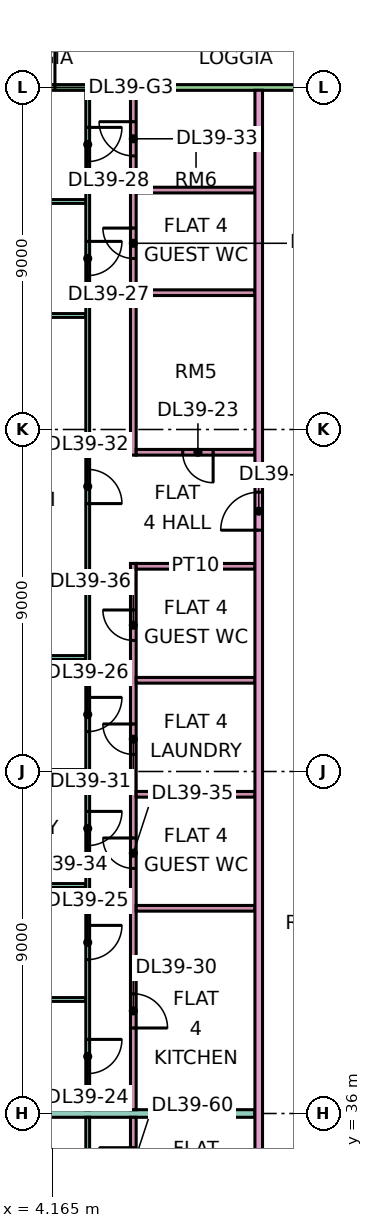
"""IFC4 building model, lengths in metres.
Left out: names, types, materials, properties, quantities, classifications, styles, units other than length and angle.
Written with IfcOpenShell. Run it as: python <this file> out.ifc"""

import sys

from ifc_helpers import new_model, si_unit, direction, frame, frame_2d, origin, place, context, subcontext, project, spatial, rectangle, extrude, element, fill, save


model = new_model("IFC4")
c1 = context("Model", 3, precision=1e-05, world=origin(), true_north=direction((0.0, 1.0)))
c2 = subcontext(c1, "Body", "Model", "MODEL_VIEW")
j1 = project(units=[si_unit("LENGTHUNIT", "METRE"), si_unit("PLANEANGLEUNIT", "RADIAN")], contexts=[c1])
p1 = place(None, origin())
s1 = spatial("IfcSite", under=j1, at=p1, CompositionType="ELEMENT")
p2 = place(p1, origin())
s2 = spatial("IfcBuilding", under=s1, at=p2, CompositionType="ELEMENT")
p3 = place(p2, frame((0.0, 0.0, 172.4)))
s3 = spatial("IfcBuildingStorey", under=s2, at=p3, CompositionType="ELEMENT", Elevation=172.4)
p4 = place(p3, frame((11.925, 63.0, 0.0), z_axis=(0.0, 0.0, 1.0), x_axis=(-1.0, 0.0, 0.0)))
e1 = element("IfcWall", 1, at=p4, inside=s3, PredefinedType="SOLIDWALL", context=c2, shape_type="SweptSolid", body=[
    extrude(rectangle(XDim=10.35, YDim=0.15, at=frame_2d((5.175, 0.0))), origin(), (0.0, 0.0, 1.0), 3.35),
])
p5 = place(p4, frame((7.688, 0.0, 0.0)))
e2 = element("IfcOpeningElement", 2, at=p5, cuts=e1, PredefinedType="OPENING", context=c2, shape_type="SweptSolid", body=[
    extrude(rectangle(XDim=1.8, YDim=2.4, at=frame_2d((0.9, 1.2))), frame((0.0, 0.085, 0.0), z_axis=(0.0, -1.0, 0.0), x_axis=(1.0, 0.0, 0.0)), (0.0, 0.0, 1.0), 0.17),
])
p6 = place(p3, frame((-1.351, 39.0, 0.0), z_axis=(0.0, 0.0, 1.0), x_axis=(1.0, 0.0, 0.0)))
e3 = element("IfcWall", 3, at=p6, inside=s3, PredefinedType="PARTITIONING", context=c2, shape_type="SweptSolid", body=[
    extrude(rectangle(XDim=6.401, YDim=0.1, at=frame_2d((3.201, 0.0))), origin(), (0.0, 0.0, 1.0), 3.35),
])
p7 = place(p3, frame((0.0, 36.0, 0.0), z_axis=(0.0, 0.0, 1.0), x_axis=(1.0, 0.0, 0.0)))
e4 = element("IfcWall", 4, at=p7, inside=s3, PredefinedType="PARTITIONING", context=c2, shape_type="SweptSolid", body=[
    extrude(rectangle(XDim=9.5, YDim=0.2, at=frame_2d((4.75, 0.0))), origin(), (0.0, 0.0, 1.0), 3.35),
])
p8 = place(p3, frame((-1.35, 42.0, 0.0), z_axis=(0.0, 0.0, 1.0), x_axis=(1.0, 0.0, 0.0)))
e5 = element("IfcWall", 5, at=p8, inside=s3, PredefinedType="PARTITIONING", context=c2, shape_type="SweptSolid", body=[
    extrude(rectangle(XDim=6.4, YDim=0.1, at=frame_2d((3.2, 0.0))), origin(), (0.0, 0.0, 1.0), 3.35),
])
p9 = place(p3, frame((0.0, 45.0, 0.0), z_axis=(0.0, 0.0, 1.0), x_axis=(1.0, 0.0, 0.0)))
e6 = element("IfcWall", 6, at=p9, inside=s3, PredefinedType="PARTITIONING", context=c2, shape_type="SweptSolid", body=[
    extrude(rectangle(XDim=5.05, YDim=0.1, at=frame_2d((2.525, 0.0))), origin(), (0.0, 0.0, 1.0), 3.35),
])
p10 = place(p3, frame((0.0, 48.0, 0.0), z_axis=(0.0, 0.0, 1.0), x_axis=(1.0, 0.0, 0.0)))
e7 = element("IfcWall", 7, at=p10, inside=s3, PredefinedType="PARTITIONING", context=c2, shape_type="SweptSolid", body=[
    extrude(rectangle(XDim=5.05, YDim=0.1, at=frame_2d((2.525, 0.0))), origin(), (0.0, 0.0, 1.0), 3.35),
])
for number, where, z_axis, x_axis in (
    (8, (0.074, 57.0, 0.0), (0.0, 0.0, 1.0), (1.0, 0.0, 0.0)),
    (9, (0.074, 60.0, 0.0), (0.0, 0.0, 1.0), (1.0, 0.0, 0.0)),
):
    element("IfcWall", number, at=place(p3, frame(where, z_axis=z_axis, x_axis=x_axis)), inside=s3, PredefinedType="PARTITIONING", context=c2, shape_type="SweptSolid", body=[
        extrude(rectangle(XDim=4.976, YDim=0.1, at=frame_2d((2.488, 0.0))), origin(), (0.0, 0.0, 1.0), 3.35),
    ])
p11 = place(p3, frame((5.1, 29.95, 0.0), z_axis=(0.0, 0.0, 1.0), x_axis=(0.0, 1.0, 0.0)))
e10 = element("IfcWall", 10, at=p11, inside=s3, PredefinedType="PARTITIONING", context=c2, shape_type="SweptSolid", body=[
    extrude(rectangle(XDim=5.95, YDim=0.1, at=frame_2d((2.975, 0.0))), origin(), (0.0, 0.0, 1.0), 3.35),
])
p12 = place(p11, frame((4.1, 0.0, 0.0)))
e11 = element("IfcOpeningElement", 11, at=p12, cuts=e10, PredefinedType="OPENING", context=c2, shape_type="SweptSolid", body=[
    extrude(rectangle(XDim=0.9, YDim=2.1, at=frame_2d((0.45, 1.05))), frame((0.0, 0.06, 0.0), z_axis=(0.0, -1.0, 0.0), x_axis=(1.0, 0.0, 0.0)), (0.0, 0.0, 1.0), 0.12),
])
p13 = place(p11, frame((1.1, 0.0, 0.0)))
e12 = element("IfcOpeningElement", 12, at=p13, cuts=e10, PredefinedType="OPENING", context=c2, shape_type="SweptSolid", body=[
    extrude(rectangle(XDim=0.9, YDim=2.1, at=frame_2d((0.45, 1.05))), frame((0.0, 0.06, 0.0), z_axis=(0.0, -1.0, 0.0), x_axis=(1.0, 0.0, 0.0)), (0.0, 0.0, 1.0), 0.12),
])
p14 = place(p3, frame((5.1, 36.1, 0.0), z_axis=(0.0, 0.0, 1.0), x_axis=(0.0, 1.0, 0.0)))
e13 = element("IfcWall", 13, at=p14, inside=s3, PredefinedType="PARTITIONING", context=c2, shape_type="SweptSolid", body=[
    extrude(rectangle(XDim=26.826, YDim=0.1, at=frame_2d((13.413, 0.0))), origin(), (0.0, 0.0, 1.0), 3.35),
])
p15 = place(p14, frame((0.95, 0.0, 0.0)))
e14 = element("IfcOpeningElement", 14, at=p15, cuts=e13, PredefinedType="OPENING", context=c2, shape_type="SweptSolid", body=[
    extrude(rectangle(XDim=0.9, YDim=2.1, at=frame_2d((0.45, 1.05))), frame((0.0, 0.06, 0.0), z_axis=(0.0, -1.0, 0.0), x_axis=(1.0, 0.0, 0.0)), (0.0, 0.0, 1.0), 0.12),
])
p16 = place(p14, frame((3.95, 0.0, 0.0)))
e15 = element("IfcOpeningElement", 15, at=p16, cuts=e13, PredefinedType="OPENING", context=c2, shape_type="SweptSolid", body=[
    extrude(rectangle(XDim=0.9, YDim=2.1, at=frame_2d((0.45, 1.05))), frame((0.0, 0.06, 0.0), z_axis=(0.0, -1.0, 0.0), x_axis=(1.0, 0.0, 0.0)), (0.0, 0.0, 1.0), 0.12),
])
p17 = place(p14, frame((9.95, 0.0, 0.0)))
e16 = element("IfcOpeningElement", 16, at=p17, cuts=e13, PredefinedType="OPENING", context=c2, shape_type="SweptSolid", body=[
    extrude(rectangle(XDim=0.9, YDim=2.1, at=frame_2d((0.45, 1.05))), frame((0.0, 0.06, 0.0), z_axis=(0.0, -1.0, 0.0), x_axis=(1.0, 0.0, 0.0)), (0.0, 0.0, 1.0), 0.12),
])
p18 = place(p14, frame((21.95, 0.0, 0.0)))
e17 = element("IfcOpeningElement", 17, at=p18, cuts=e13, PredefinedType="OPENING", context=c2, shape_type="SweptSolid", body=[
    extrude(rectangle(XDim=0.9, YDim=2.1, at=frame_2d((0.45, 1.05))), frame((0.0, 0.06, 0.0), z_axis=(0.0, -1.0, 0.0), x_axis=(1.0, 0.0, 0.0)), (0.0, 0.0, 1.0), 0.12),
])
p19 = place(p14, frame((24.95, 0.0, 0.0)))
e18 = element("IfcOpeningElement", 18, at=p19, cuts=e13, PredefinedType="OPENING", context=c2, shape_type="SweptSolid", body=[
    extrude(rectangle(XDim=0.9, YDim=2.1, at=frame_2d((0.45, 1.05))), frame((0.0, 0.06, 0.0), z_axis=(0.0, -1.0, 0.0), x_axis=(1.0, 0.0, 0.0)), (0.0, 0.0, 1.0), 0.12),
])
p20 = place(p14, frame((15.95, 0.0, 0.0)))
e19 = element("IfcOpeningElement", 19, at=p20, cuts=e13, PredefinedType="OPENING", context=c2, shape_type="SweptSolid", body=[
    extrude(rectangle(XDim=0.9, YDim=2.1, at=frame_2d((0.45, 1.05))), frame((0.0, 0.06, 0.0), z_axis=(0.0, -1.0, 0.0), x_axis=(1.0, 0.0, 0.0)), (0.0, 0.0, 1.0), 0.12),
])
p21 = place(p14, frame((6.95, 0.0, 0.0)))
e20 = element("IfcOpeningElement", 20, at=p21, cuts=e13, PredefinedType="OPENING", context=c2, shape_type="SweptSolid", body=[
    extrude(rectangle(XDim=0.9, YDim=2.1, at=frame_2d((0.45, 1.05))), frame((0.0, 0.06, 0.0), z_axis=(0.0, -1.0, 0.0), x_axis=(1.0, 0.0, 0.0)), (0.0, 0.0, 1.0), 0.12),
])
p22 = place(p3, frame((6.3, 26.325, 0.0), z_axis=(0.0, 0.0, 1.0), x_axis=(0.0, 1.0, 0.0)))
e21 = element("IfcWall", 21, at=p22, inside=s3, PredefinedType="PARTITIONING", context=c2, shape_type="SweptSolid", body=[
    extrude(rectangle(XDim=9.575, YDim=0.15, at=frame_2d((4.788, 0.0))), origin(), (0.0, 0.0, 1.0), 3.35),
])
p23 = place(p22, frame((7.875, 0.0, 0.0)))
e22 = element("IfcOpeningElement", 22, at=p23, cuts=e21, PredefinedType="OPENING", context=c2, shape_type="SweptSolid", body=[
    extrude(rectangle(XDim=0.9, YDim=2.1, at=frame_2d((0.45, 1.05))), frame((0.0, 0.085, 0.0), z_axis=(0.0, -1.0, 0.0), x_axis=(1.0, 0.0, 0.0)), (0.0, 0.0, 1.0), 0.17),
])
p24 = place(p22, frame((4.725, 0.0, 0.0)))
e23 = element("IfcOpeningElement", 23, at=p24, cuts=e21, PredefinedType="OPENING", context=c2, shape_type="SweptSolid", body=[
    extrude(rectangle(XDim=0.8, YDim=2.1, at=frame_2d((0.4, 1.05))), frame((0.0, 0.085, 0.0), z_axis=(0.0, -1.0, 0.0), x_axis=(1.0, 0.0, 0.0)), (0.0, 0.0, 1.0), 0.17),
])
p25 = place(p3, frame((6.3, 36.1, 0.0), z_axis=(0.0, 0.0, 1.0), x_axis=(0.0, 1.0, 0.0)))
e24 = element("IfcWall", 24, at=p25, inside=s3, PredefinedType="PARTITIONING", context=c2, shape_type="SweptSolid", body=[
    extrude(rectangle(XDim=14.375, YDim=0.15, at=frame_2d((7.188, 0.0))), origin(), (0.0, 0.0, 1.0), 3.35),
])
p26 = place(p25, frame((2.15, 0.0, 0.0)))
e25 = element("IfcOpeningElement", 25, at=p26, cuts=e24, PredefinedType="OPENING", context=c2, shape_type="SweptSolid", body=[
    extrude(rectangle(XDim=0.9, YDim=2.1, at=frame_2d((0.45, 1.05))), frame((0.0, 0.085, 0.0), z_axis=(0.0, -1.0, 0.0), x_axis=(1.0, 0.0, 0.0)), (0.0, 0.0, 1.0), 0.17),
])
p27 = place(p25, frame((9.35, 0.0, 0.0)))
e26 = element("IfcOpeningElement", 26, at=p27, cuts=e24, PredefinedType="OPENING", context=c2, shape_type="SweptSolid", body=[
    extrude(rectangle(XDim=0.8, YDim=2.1, at=frame_2d((0.4, 1.05))), frame((0.0, 0.085, 0.0), z_axis=(0.0, -1.0, 0.0), x_axis=(1.0, 0.0, 0.0)), (0.0, 0.0, 1.0), 0.17),
])
p28 = place(p25, frame((6.35, 0.0, 0.0)))
e27 = element("IfcOpeningElement", 27, at=p28, cuts=e24, PredefinedType="OPENING", context=c2, shape_type="SweptSolid", body=[
    extrude(rectangle(XDim=0.8, YDim=2.1, at=frame_2d((0.4, 1.05))), frame((0.0, 0.085, 0.0), z_axis=(0.0, -1.0, 0.0), x_axis=(1.0, 0.0, 0.0)), (0.0, 0.0, 1.0), 0.17),
])
p29 = place(p25, frame((12.35, 0.0, 0.0)))
e28 = element("IfcOpeningElement", 28, at=p29, cuts=e24, PredefinedType="OPENING", context=c2, shape_type="SweptSolid", body=[
    extrude(rectangle(XDim=0.8, YDim=2.1, at=frame_2d((0.4, 1.05))), frame((0.0, 0.085, 0.0), z_axis=(0.0, -1.0, 0.0), x_axis=(1.0, 0.0, 0.0)), (0.0, 0.0, 1.0), 0.17),
])
p30 = place(p3, frame((6.3, 53.325, 0.0), z_axis=(0.0, 0.0, 1.0), x_axis=(0.0, 1.0, 0.0)))
e29 = element("IfcWall", 29, at=p30, inside=s3, PredefinedType="PARTITIONING", context=c2, shape_type="SweptSolid", body=[
    extrude(rectangle(XDim=9.601, YDim=0.15, at=frame_2d((4.801, 0.0))), origin(), (0.0, 0.0, 1.0), 3.35),
])
p31 = place(p30, frame((7.875, 0.0, 0.0)))
e30 = element("IfcOpeningElement", 30, at=p31, cuts=e29, PredefinedType="OPENING", context=c2, shape_type="SweptSolid", body=[
    extrude(rectangle(XDim=0.9, YDim=2.1, at=frame_2d((0.45, 1.05))), frame((0.0, 0.085, 0.0), z_axis=(0.0, -1.0, 0.0), x_axis=(1.0, 0.0, 0.0)), (0.0, 0.0, 1.0), 0.17),
])
p32 = place(p30, frame((5.175, 0.0, 0.0)))
e31 = element("IfcOpeningElement", 31, at=p32, cuts=e29, PredefinedType="OPENING", context=c2, shape_type="SweptSolid", body=[
    extrude(rectangle(XDim=0.8, YDim=2.1, at=frame_2d((0.4, 1.05))), frame((0.0, 0.085, 0.0), z_axis=(0.0, -1.0, 0.0), x_axis=(1.0, 0.0, 0.0)), (0.0, 0.0, 1.0), 0.17),
])
for number, where, z_axis, x_axis in (
    (32, (6.375, 41.4, 0.0), (0.0, 0.0, 1.0), (1.0, 0.0, 0.0)),
    (33, (6.375, 44.4, 0.0), (0.0, 0.0, 1.0), (1.0, 0.0, 0.0)),
    (34, (6.375, 47.4, 0.0), (0.0, 0.0, 1.0), (1.0, 0.0, 0.0)),
    (35, (6.375, 50.4, 0.0), (0.0, 0.0, 1.0), (1.0, 0.0, 0.0)),
):
    element("IfcWall", number, at=place(p3, frame(where, z_axis=z_axis, x_axis=x_axis)), inside=s3, PredefinedType="PARTITIONING", context=c2, shape_type="SweptSolid", body=[
        extrude(rectangle(XDim=3.125, YDim=0.15, at=frame_2d((1.562, 0.0))), origin(), (0.0, 0.0, 1.0), 3.35),
    ])
p33 = place(p3, frame((6.375, 53.4, 0.0), z_axis=(0.0, 0.0, 1.0), x_axis=(1.0, 0.0, 0.0)))
e36 = element("IfcWall", 36, at=p33, inside=s3, PredefinedType="PARTITIONING", context=c2, shape_type="SweptSolid", body=[
    extrude(rectangle(XDim=3.125, YDim=0.15, at=frame_2d((1.562, 0.0))), origin(), (0.0, 0.0, 1.0), 3.35),
])
p34 = place(p33, frame((1.225, 0.0, 0.0)))
e37 = element("IfcOpeningElement", 37, at=p34, cuts=e36, PredefinedType="OPENING", context=c2, shape_type="SweptSolid", body=[
    extrude(rectangle(XDim=0.8, YDim=2.1, at=frame_2d((0.4, 1.05))), frame((0.0, 0.085, 0.0), z_axis=(0.0, -1.0, 0.0), x_axis=(1.0, 0.0, 0.0)), (0.0, 0.0, 1.0), 0.17),
])
for number, where, z_axis, x_axis in (
    (38, (6.375, 57.6, 0.0), (0.0, 0.0, 1.0), (1.0, 0.0, 0.0)),
    (39, (6.375, 60.3, 0.0), (0.0, 0.0, 1.0), (1.0, 0.0, 0.0)),
):
    element("IfcWall", number, at=place(p3, frame(where, z_axis=z_axis, x_axis=x_axis)), inside=s3, PredefinedType="PARTITIONING", context=c2, shape_type="SweptSolid", body=[
        extrude(rectangle(XDim=3.125, YDim=0.15, at=frame_2d((1.562, 0.0))), origin(), (0.0, 0.0, 1.0), 3.35),
    ])
p35 = place(p3, frame((9.6, 20.0, 0.0), z_axis=(0.0, 0.0, 1.0), x_axis=(0.0, 1.0, 0.0)))
e40 = element("IfcWall", 40, at=p35, inside=s3, PredefinedType="PARTITIONING", context=c2, shape_type="SweptSolid", body=[
    extrude(rectangle(XDim=42.926, YDim=0.2, at=frame_2d((21.463, 0.0))), origin(), (0.0, 0.0, 1.0), 3.35),
])
p36 = place(p35, frame((31.35, 0.0, 0.0)))
e41 = element("IfcOpeningElement", 41, at=p36, cuts=e40, PredefinedType="OPENING", context=c2, shape_type="SweptSolid", body=[
    extrude(rectangle(XDim=1.0, YDim=2.1, at=frame_2d((0.5, 1.05))), frame((0.0, 0.11, 0.0), z_axis=(0.0, -1.0, 0.0), x_axis=(1.0, 0.0, 0.0)), (0.0, 0.0, 1.0), 0.22),
])
p37 = place(p35, frame((0.6, 0.0, 0.0)))
e42 = element("IfcOpeningElement", 42, at=p37, cuts=e40, PredefinedType="OPENING", context=c2, shape_type="SweptSolid", body=[
    extrude(rectangle(XDim=1.2, YDim=2.1, at=frame_2d((0.6, 1.05))), frame((0.0, 0.11, 0.0), z_axis=(0.0, -1.0, 0.0), x_axis=(1.0, 0.0, 0.0)), (0.0, 0.0, 1.0), 0.22),
])
p38 = place(p35, frame((3.9, 0.0, 0.0)))
e43 = element("IfcOpeningElement", 43, at=p38, cuts=e40, PredefinedType="OPENING", context=c2, shape_type="SweptSolid", body=[
    extrude(rectangle(XDim=1.0, YDim=2.1, at=frame_2d((0.5, 1.05))), frame((0.0, 0.11, 0.0), z_axis=(0.0, -1.0, 0.0), x_axis=(1.0, 0.0, 0.0)), (0.0, 0.0, 1.0), 0.22),
])
p39 = place(p5, frame((1.8, 0.0, 0.0), z_axis=(0.0, 0.0, 1.0), x_axis=(-1.0, 0.0, 0.0)))
e44 = element("IfcDoor", 44, at=p39, inside=s3, OperationType="DOUBLE_DOOR_SINGLE_SWING", PredefinedType="DOOR", context=c2, shape_type="SweptSolid", body=[
    extrude(rectangle(XDim=1.8, YDim=2.4, at=frame_2d((0.9, 1.2))), frame((0.0, 0.025, 0.0), z_axis=(0.0, -1.0, 0.0), x_axis=(1.0, 0.0, 0.0)), (0.0, 0.0, 1.0), 0.05),
])
fill(e2, e44)
p40 = place(p34, origin())
e45 = element("IfcDoor", 45, at=p40, inside=s3, OperationType="SINGLE_SWING_RIGHT", PredefinedType="DOOR", context=c2, shape_type="SweptSolid", body=[
    extrude(rectangle(XDim=0.8, YDim=2.1, at=frame_2d((0.4, 1.05))), frame((0.0, 0.025, 0.0), z_axis=(0.0, -1.0, 0.0), x_axis=(1.0, 0.0, 0.0)), (0.0, 0.0, 1.0), 0.05),
])
fill(e37, e45)
p41 = place(p15, origin())
e46 = element("IfcDoor", 46, at=p41, inside=s3, OperationType="SINGLE_SWING_RIGHT", PredefinedType="DOOR", context=c2, shape_type="SweptSolid", body=[
    extrude(rectangle(XDim=0.9, YDim=2.1, at=frame_2d((0.45, 1.05))), frame((0.0, 0.025, 0.0), z_axis=(0.0, -1.0, 0.0), x_axis=(1.0, 0.0, 0.0)), (0.0, 0.0, 1.0), 0.05),
])
fill(e14, e46)
p42 = place(p16, origin())
e47 = element("IfcDoor", 47, at=p42, inside=s3, OperationType="SINGLE_SWING_RIGHT", PredefinedType="DOOR", context=c2, shape_type="SweptSolid", body=[
    extrude(rectangle(XDim=0.9, YDim=2.1, at=frame_2d((0.45, 1.05))), frame((0.0, 0.025, 0.0), z_axis=(0.0, -1.0, 0.0), x_axis=(1.0, 0.0, 0.0)), (0.0, 0.0, 1.0), 0.05),
])
fill(e15, e47)
p43 = place(p17, origin())
e48 = element("IfcDoor", 48, at=p43, inside=s3, OperationType="SINGLE_SWING_RIGHT", PredefinedType="DOOR", context=c2, shape_type="SweptSolid", body=[
    extrude(rectangle(XDim=0.9, YDim=2.1, at=frame_2d((0.45, 1.05))), frame((0.0, 0.025, 0.0), z_axis=(0.0, -1.0, 0.0), x_axis=(1.0, 0.0, 0.0)), (0.0, 0.0, 1.0), 0.05),
])
fill(e16, e48)
p44 = place(p18, origin())
e49 = element("IfcDoor", 49, at=p44, inside=s3, OperationType="SINGLE_SWING_RIGHT", PredefinedType="DOOR", context=c2, shape_type="SweptSolid", body=[
    extrude(rectangle(XDim=0.9, YDim=2.1, at=frame_2d((0.45, 1.05))), frame((0.0, 0.025, 0.0), z_axis=(0.0, -1.0, 0.0), x_axis=(1.0, 0.0, 0.0)), (0.0, 0.0, 1.0), 0.05),
])
fill(e17, e49)
p45 = place(p19, origin())
e50 = element("IfcDoor", 50, at=p45, inside=s3, OperationType="SINGLE_SWING_RIGHT", PredefinedType="DOOR", context=c2, shape_type="SweptSolid", body=[
    extrude(rectangle(XDim=0.9, YDim=2.1, at=frame_2d((0.45, 1.05))), frame((0.0, 0.025, 0.0), z_axis=(0.0, -1.0, 0.0), x_axis=(1.0, 0.0, 0.0)), (0.0, 0.0, 1.0), 0.05),
])
fill(e18, e50)
p46 = place(p36, origin())
e51 = element("IfcDoor", 51, at=p46, inside=s3, OperationType="SINGLE_SWING_LEFT", PredefinedType="DOOR", context=c2, shape_type="SweptSolid", body=[
    extrude(rectangle(XDim=1.0, YDim=2.1, at=frame_2d((0.5, 1.05))), frame((0.0, 0.025, 0.0), z_axis=(0.0, -1.0, 0.0), x_axis=(1.0, 0.0, 0.0)), (0.0, 0.0, 1.0), 0.05),
])
fill(e41, e51)
p47 = place(p26, frame((0.9, 0.0, 0.0), z_axis=(0.0, 0.0, 1.0), x_axis=(-1.0, 0.0, 0.0)))
e52 = element("IfcDoor", 52, at=p47, inside=s3, OperationType="SINGLE_SWING_LEFT", PredefinedType="DOOR", context=c2, shape_type="SweptSolid", body=[
    extrude(rectangle(XDim=0.9, YDim=2.1, at=frame_2d((0.45, 1.05))), frame((0.0, 0.025, 0.0), z_axis=(0.0, -1.0, 0.0), x_axis=(1.0, 0.0, 0.0)), (0.0, 0.0, 1.0), 0.05),
])
fill(e25, e52)
p48 = place(p27, frame((0.8, 0.0, 0.0), z_axis=(0.0, 0.0, 1.0), x_axis=(-1.0, 0.0, 0.0)))
e53 = element("IfcDoor", 53, at=p48, inside=s3, OperationType="SINGLE_SWING_RIGHT", PredefinedType="DOOR", context=c2, shape_type="SweptSolid", body=[
    extrude(rectangle(XDim=0.8, YDim=2.1, at=frame_2d((0.4, 1.05))), frame((0.0, 0.025, 0.0), z_axis=(0.0, -1.0, 0.0), x_axis=(1.0, 0.0, 0.0)), (0.0, 0.0, 1.0), 0.05),
])
fill(e26, e53)
p49 = place(p20, frame((0.9, 0.0, 0.0), z_axis=(0.0, 0.0, 1.0), x_axis=(-1.0, 0.0, 0.0)))
e54 = element("IfcDoor", 54, at=p49, inside=s3, OperationType="SINGLE_SWING_LEFT", PredefinedType="DOOR", context=c2, shape_type="SweptSolid", body=[
    extrude(rectangle(XDim=0.9, YDim=2.1, at=frame_2d((0.45, 1.05))), frame((0.0, 0.025, 0.0), z_axis=(0.0, -1.0, 0.0), x_axis=(1.0, 0.0, 0.0)), (0.0, 0.0, 1.0), 0.05),
])
fill(e19, e54)
p50 = place(p31, frame((0.9, 0.0, 0.0), z_axis=(0.0, 0.0, 1.0), x_axis=(-1.0, 0.0, 0.0)))
e55 = element("IfcDoor", 55, at=p50, inside=s3, OperationType="SINGLE_SWING_RIGHT", PredefinedType="DOOR", context=c2, shape_type="SweptSolid", body=[
    extrude(rectangle(XDim=0.9, YDim=2.1, at=frame_2d((0.45, 1.05))), frame((0.0, 0.025, 0.0), z_axis=(0.0, -1.0, 0.0), x_axis=(1.0, 0.0, 0.0)), (0.0, 0.0, 1.0), 0.05),
])
fill(e30, e55)
p51 = place(p21, origin())
e56 = element("IfcDoor", 56, at=p51, inside=s3, OperationType="SINGLE_SWING_RIGHT", PredefinedType="DOOR", context=c2, shape_type="SweptSolid", body=[
    extrude(rectangle(XDim=0.9, YDim=2.1, at=frame_2d((0.45, 1.05))), frame((0.0, 0.025, 0.0), z_axis=(0.0, -1.0, 0.0), x_axis=(1.0, 0.0, 0.0)), (0.0, 0.0, 1.0), 0.05),
])
fill(e20, e56)
p52 = place(p28, frame((0.8, 0.0, 0.0), z_axis=(0.0, 0.0, 1.0), x_axis=(-1.0, 0.0, 0.0)))
e57 = element("IfcDoor", 57, at=p52, inside=s3, OperationType="SINGLE_SWING_RIGHT", PredefinedType="DOOR", context=c2, shape_type="SweptSolid", body=[
    extrude(rectangle(XDim=0.8, YDim=2.1, at=frame_2d((0.4, 1.05))), frame((0.0, 0.025, 0.0), z_axis=(0.0, -1.0, 0.0), x_axis=(1.0, 0.0, 0.0)), (0.0, 0.0, 1.0), 0.05),
])
fill(e27, e57)
p53 = place(p29, frame((0.8, 0.0, 0.0), z_axis=(0.0, 0.0, 1.0), x_axis=(-1.0, 0.0, 0.0)))
e58 = element("IfcDoor", 58, at=p53, inside=s3, OperationType="SINGLE_SWING_RIGHT", PredefinedType="DOOR", context=c2, shape_type="SweptSolid", body=[
    extrude(rectangle(XDim=0.8, YDim=2.1, at=frame_2d((0.4, 1.05))), frame((0.0, 0.025, 0.0), z_axis=(0.0, -1.0, 0.0), x_axis=(1.0, 0.0, 0.0)), (0.0, 0.0, 1.0), 0.05),
])
fill(e28, e58)
p54 = place(p32, frame((0.8, 0.0, 0.0), z_axis=(0.0, 0.0, 1.0), x_axis=(-1.0, 0.0, 0.0)))
e59 = element("IfcDoor", 59, at=p54, inside=s3, OperationType="SINGLE_SWING_RIGHT", PredefinedType="DOOR", context=c2, shape_type="SweptSolid", body=[
    extrude(rectangle(XDim=0.8, YDim=2.1, at=frame_2d((0.4, 1.05))), frame((0.0, 0.025, 0.0), z_axis=(0.0, -1.0, 0.0), x_axis=(1.0, 0.0, 0.0)), (0.0, 0.0, 1.0), 0.05),
])
fill(e31, e59)
p55 = place(p23, frame((0.9, 0.0, 0.0), z_axis=(0.0, 0.0, 1.0), x_axis=(-1.0, 0.0, 0.0)))
e60 = element("IfcDoor", 60, at=p55, inside=s3, OperationType="SINGLE_SWING_RIGHT", PredefinedType="DOOR", context=c2, shape_type="SweptSolid", body=[
    extrude(rectangle(XDim=0.9, YDim=2.1, at=frame_2d((0.45, 1.05))), frame((0.0, 0.025, 0.0), z_axis=(0.0, -1.0, 0.0), x_axis=(1.0, 0.0, 0.0)), (0.0, 0.0, 1.0), 0.05),
])
fill(e22, e60)
save(model, sys.argv[1])
